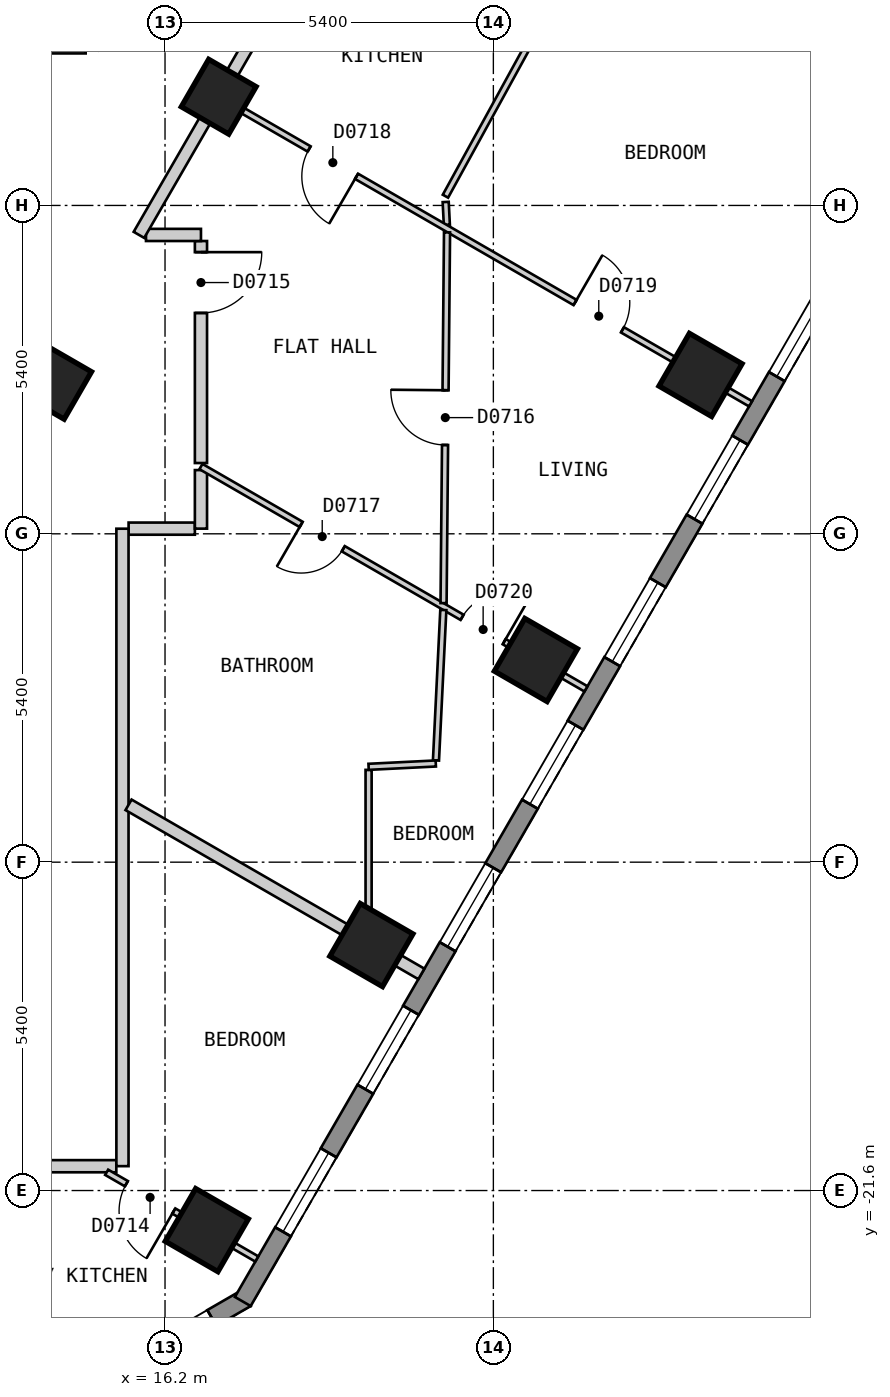
"""IFC4 building model, lengths in metres.
Left out: names, types, materials, properties, quantities, classifications, styles, units other than length and angle.
Written with IfcOpenShell. Run it as: python <this file> out.ifc"""

import sys

from ifc_helpers import new_model, si_unit, direction, frame, frame_2d, origin, origin_2d, place, context, subcontext, project, spatial, polyline, rectangle, outline, extrude, element, fill, save


model = new_model("IFC4")
c1 = context("Model", 3, precision=1e-05, world=origin(), true_north=direction((0.0, 1.0)))
c2 = subcontext(c1, "Body", "Model", "MODEL_VIEW")
j1 = project(units=[si_unit("LENGTHUNIT", "METRE"), si_unit("PLANEANGLEUNIT", "RADIAN")], contexts=[c1])
p1 = place(None, origin())
s1 = spatial("IfcSite", under=j1, at=p1, CompositionType="ELEMENT")
p2 = place(p1, origin())
s2 = spatial("IfcBuilding", under=s1, at=p2, CompositionType="ELEMENT")
p3 = place(p2, frame((0.0, 0.0, 99.0)))
s3 = spatial("IfcBuildingStorey", under=s2, at=p3, CompositionType="ELEMENT", Elevation=99.0)
for number, where, z_axis, x_axis in (
    (1, (16.887, -22.251, 0.0), (0.0, 0.0, 1.0), (0.5, 0.866, 0.0)),
    (2, (19.594, -17.563, 0.0), (0.0, 0.0, 1.0), (0.5, 0.866, 0.0)),
    (3, (22.3, -12.875, 0.0), (0.0, 0.0, 1.0), (0.5, 0.866, 0.0)),
    (4, (25.007, -8.187, 0.0), (0.0, 0.0, 1.0), (0.5, 0.866, 0.0)),
):
    element("IfcColumn", number, at=place(p3, frame(where, z_axis=z_axis, x_axis=x_axis)), inside=s3, PredefinedType="COLUMN", context=c2, shape_type="SweptSolid", body=[
        extrude(rectangle(XDim=1.0, YDim=1.0, at=origin_2d()), origin(), (0.0, 0.0, 1.0), 3.0),
    ])
for number, where, z_axis, x_axis in (
    (5, (14.376, -8.3, 0.0), (0.0, 0.0, 1.0), (0.5, 0.866, 0.0)),
    (6, (17.083, -3.612, 0.0), (0.0, 0.0, 1.0), (0.5, 0.866, 0.0)),
):
    element("IfcColumn", number, at=place(p3, frame(where, z_axis=z_axis, x_axis=x_axis)), inside=s3, PredefinedType="COLUMN", context=c2, shape_type="SweptSolid", body=[
        extrude(rectangle(XDim=0.9, YDim=0.9, at=origin_2d()), origin(), (0.0, 0.0, 1.0), 3.0),
    ])
p4 = place(p3, frame((13.204, -25.87, 0.0), z_axis=(0.0, 0.0, 1.0), x_axis=(0.866010750942, 0.50002537861, 0.0)))
e7 = element("IfcWall", 7, at=p4, inside=s3, PredefinedType="SOLIDWALL", context=c2, shape_type="SweptSolid", body=[
    extrude(outline(polyline([(0.0, -0.15), (5.0, -0.15), (4.919, 0.15), (0.08, 0.15), (0.0, -0.15)])), origin(), (0.0, 0.0, 1.0), 2.7),
])
p5 = place(p4, frame((0.65, 0.0, 0.15)))
e8 = element("IfcOpeningElement", 8, at=p5, cuts=e7, PredefinedType="OPENING", context=c2, shape_type="SweptSolid", body=[
    extrude(rectangle(XDim=1.2, YDim=2.1, at=frame_2d((0.6, 1.05))), frame((0.0, 0.16, 0.0), z_axis=(0.0, -1.0, 0.0), x_axis=(1.0, 0.0, 0.0)), (0.0, 0.0, 1.0), 0.32),
])
p6 = place(p4, frame((3.149, 0.0, 0.15)))
e9 = element("IfcOpeningElement", 9, at=p6, cuts=e7, PredefinedType="OPENING", context=c2, shape_type="SweptSolid", body=[
    extrude(rectangle(XDim=1.2, YDim=2.1, at=frame_2d((0.6, 1.05))), frame((0.0, 0.16, 0.0), z_axis=(0.0, -1.0, 0.0), x_axis=(1.0, 0.0, 0.0)), (0.0, 0.0, 1.0), 0.32),
])
p7 = place(p3, frame((17.479, -23.425, 0.0), z_axis=(0.0, 0.0, 1.0), x_axis=(0.500035407905, 0.866004960056, 0.0)))
e10 = element("IfcWall", 10, at=p7, inside=s3, PredefinedType="SOLIDWALL", context=c2, shape_type="SweptSolid", body=[
    extrude(outline(polyline([(0.0, -0.15), (23.094, -0.15), (23.014, 0.15), (0.08, 0.15), (0.0, -0.15)])), origin(), (0.0, 0.0, 1.0), 2.7),
])
p8 = place(p7, frame((1.324, 0.0, 0.15)))
e11 = element("IfcOpeningElement", 11, at=p8, cuts=e10, PredefinedType="OPENING", context=c2, shape_type="SweptSolid", body=[
    extrude(rectangle(XDim=1.5, YDim=2.1, at=frame_2d((0.75, 1.05))), frame((0.0, 0.16, 0.0), z_axis=(0.0, -1.0, 0.0), x_axis=(1.0, 0.0, 0.0)), (0.0, 0.0, 1.0), 0.32),
])
p9 = place(p7, frame((4.031, 0.0, 0.15)))
e12 = element("IfcOpeningElement", 12, at=p9, cuts=e10, PredefinedType="OPENING", context=c2, shape_type="SweptSolid", body=[
    extrude(rectangle(XDim=1.5, YDim=2.1, at=frame_2d((0.75, 1.05))), frame((0.0, 0.16, 0.0), z_axis=(0.0, -1.0, 0.0), x_axis=(1.0, 0.0, 0.0)), (0.0, 0.0, 1.0), 0.32),
])
p10 = place(p7, frame((6.737, 0.0, 0.15)))
e13 = element("IfcOpeningElement", 13, at=p10, cuts=e10, PredefinedType="OPENING", context=c2, shape_type="SweptSolid", body=[
    extrude(rectangle(XDim=1.5, YDim=2.1, at=frame_2d((0.75, 1.05))), frame((0.0, 0.16, 0.0), z_axis=(0.0, -1.0, 0.0), x_axis=(1.0, 0.0, 0.0)), (0.0, 0.0, 1.0), 0.32),
])
p11 = place(p7, frame((9.444, 0.0, 0.15)))
e14 = element("IfcOpeningElement", 14, at=p11, cuts=e10, PredefinedType="OPENING", context=c2, shape_type="SweptSolid", body=[
    extrude(rectangle(XDim=1.5, YDim=2.1, at=frame_2d((0.75, 1.05))), frame((0.0, 0.16, 0.0), z_axis=(0.0, -1.0, 0.0), x_axis=(1.0, 0.0, 0.0)), (0.0, 0.0, 1.0), 0.32),
])
p12 = place(p7, frame((12.151, 0.0, 0.15)))
e15 = element("IfcOpeningElement", 15, at=p12, cuts=e10, PredefinedType="OPENING", context=c2, shape_type="SweptSolid", body=[
    extrude(rectangle(XDim=1.5, YDim=2.1, at=frame_2d((0.75, 1.05))), frame((0.0, 0.16, 0.0), z_axis=(0.0, -1.0, 0.0), x_axis=(1.0, 0.0, 0.0)), (0.0, 0.0, 1.0), 0.32),
])
p13 = place(p7, frame((14.857, 0.0, 0.15)))
e16 = element("IfcOpeningElement", 16, at=p13, cuts=e10, PredefinedType="OPENING", context=c2, shape_type="SweptSolid", body=[
    extrude(rectangle(XDim=1.5, YDim=2.1, at=frame_2d((0.75, 1.05))), frame((0.0, 0.16, 0.0), z_axis=(0.0, -1.0, 0.0), x_axis=(1.0, 0.0, 0.0)), (0.0, 0.0, 1.0), 0.32),
])
p14 = place(p7, frame((17.564, 0.0, 0.15)))
e17 = element("IfcOpeningElement", 17, at=p14, cuts=e10, PredefinedType="OPENING", context=c2, shape_type="SweptSolid", body=[
    extrude(rectangle(XDim=1.5, YDim=2.1, at=frame_2d((0.75, 1.05))), frame((0.0, 0.16, 0.0), z_axis=(0.0, -1.0, 0.0), x_axis=(1.0, 0.0, 0.0)), (0.0, 0.0, 1.0), 0.32),
])
p15 = place(p7, frame((20.271, 0.0, 0.15)))
e18 = element("IfcOpeningElement", 18, at=p15, cuts=e10, PredefinedType="OPENING", context=c2, shape_type="SweptSolid", body=[
    extrude(rectangle(XDim=1.5, YDim=2.1, at=frame_2d((0.75, 1.05))), frame((0.0, 0.16, 0.0), z_axis=(0.0, -1.0, 0.0), x_axis=(1.0, 0.0, 0.0)), (0.0, 0.0, 1.0), 0.32),
])
p16 = place(p3, frame((16.791, -5.985, 0.0), z_axis=(0.0, 0.0, 1.0), x_axis=(0.0, -1.0, 0.0)))
e19 = element("IfcWall", 19, at=p16, inside=s3, PredefinedType="PARTITIONING", context=c2, shape_type="SweptSolid", body=[
    extrude(rectangle(XDim=3.651, YDim=0.2, at=frame_2d((1.825, 0.0))), origin(), (0.0, 0.0, 1.0), 2.7),
])
p17 = place(p16, frame((0.183, 0.0, 0.0)))
e20 = element("IfcOpeningElement", 20, at=p17, cuts=e19, PredefinedType="OPENING", context=c2, shape_type="SweptSolid", body=[
    extrude(rectangle(XDim=1.0, YDim=2.1, at=frame_2d((0.5, 1.05))), frame((0.0, 0.11, 0.0), z_axis=(0.0, -1.0, 0.0), x_axis=(1.0, 0.0, 0.0)), (0.0, 0.0, 1.0), 0.22),
])
p18 = place(p3, frame((15.887, -5.885, 0.0), z_axis=(0.0, 0.0, 1.0), x_axis=(1.0, 0.0, 0.0)))
e21 = element("IfcWall", 21, at=p18, inside=s3, PredefinedType="PARTITIONING", context=c2, shape_type="SweptSolid", body=[
    extrude(rectangle(XDim=0.904, YDim=0.2, at=frame_2d((0.452, 0.0))), origin(), (0.0, 0.0, 1.0), 2.7),
])
p19 = place(p3, frame((15.601, -10.715, 0.0), z_axis=(0.0, 0.0, 1.0), x_axis=(1.0, 0.0, 0.0)))
e22 = element("IfcWall", 22, at=p19, inside=s3, PredefinedType="PARTITIONING", context=c2, shape_type="SweptSolid", body=[
    extrude(rectangle(XDim=1.09, YDim=0.2, at=frame_2d((0.545, 0.0))), origin(), (0.0, 0.0, 1.0), 2.7),
])
p20 = place(p3, frame((-15.499, -21.2, 0.0), z_axis=(0.0, 0.0, 1.0), x_axis=(1.0, 0.0, 0.0)))
e23 = element("IfcWall", 23, at=p20, inside=s3, PredefinedType="PARTITIONING", context=c2, shape_type="SweptSolid", body=[
    extrude(rectangle(XDim=30.898, YDim=0.2, at=frame_2d((15.449, 0.0))), origin(), (0.0, 0.0, 1.0), 2.7),
])
p21 = place(p20, frame((9.977, 0.0, 0.0)))
e24 = element("IfcOpeningElement", 24, at=p21, cuts=e23, PredefinedType="OPENING", context=c2, shape_type="SweptSolid", body=[
    extrude(rectangle(XDim=1.0, YDim=2.1, at=frame_2d((0.5, 1.05))), frame((0.0, 0.11, 0.0), z_axis=(0.0, -1.0, 0.0), x_axis=(1.0, 0.0, 0.0)), (0.0, 0.0, 1.0), 0.22),
])
p22 = place(p20, frame((25.046, 0.0, 0.0)))
e25 = element("IfcOpeningElement", 25, at=p22, cuts=e23, PredefinedType="OPENING", context=c2, shape_type="SweptSolid", body=[
    extrude(rectangle(XDim=1.0, YDim=2.1, at=frame_2d((0.5, 1.05))), frame((0.0, 0.11, 0.0), z_axis=(0.0, -1.0, 0.0), x_axis=(1.0, 0.0, 0.0)), (0.0, 0.0, 1.0), 0.22),
])
p23 = place(p3, frame((6.929, -2.8, 0.0), z_axis=(0.0, 0.0, 1.0), x_axis=(1.0, 0.0, 0.0)))
e26 = element("IfcWall", 26, at=p23, inside=s3, PredefinedType="PARTITIONING", context=c2, shape_type="SweptSolid", body=[
    extrude(rectangle(XDim=7.966, YDim=0.2, at=frame_2d((3.983, 0.0))), origin(), (0.0, 0.0, 1.0), 2.7),
])
p24 = place(p3, frame((15.771, -5.884, 0.0), z_axis=(0.0, 0.0, 1.0), x_axis=(0.499917542299, 0.866073005526, 0.0)))
e27 = element("IfcWall", 27, at=p24, inside=s3, PredefinedType="PARTITIONING", context=c2, shape_type="SweptSolid", body=[
    extrude(rectangle(XDim=5.525, YDim=0.2, at=frame_2d((2.762, 0.0))), origin(), (0.0, 0.0, 1.0), 2.7),
])
p25 = place(p3, frame((15.5, -21.199, 0.0), z_axis=(0.0, 0.0, 1.0), x_axis=(0.0, 1.0, 0.0)))
e28 = element("IfcWall", 28, at=p25, inside=s3, PredefinedType="PARTITIONING", context=c2, shape_type="SweptSolid", body=[
    extrude(rectangle(XDim=10.483, YDim=0.2, at=frame_2d((5.241, 0.0))), origin(), (0.0, 0.0, 1.0), 2.7),
])
p26 = place(p3, frame((16.791, -10.715, 0.0), z_axis=(0.0, 0.0, 1.0), x_axis=(0.0, 1.0, 0.0)))
e29 = element("IfcWall", 29, at=p26, inside=s3, PredefinedType="PARTITIONING", context=c2, shape_type="SweptSolid", body=[
    extrude(rectangle(XDim=0.963, YDim=0.2, at=frame_2d((0.481, 0.0))), origin(), (0.0, 0.0, 1.0), 2.7),
])
p27 = place(p3, frame((20.816, -5.343, 0.0), z_axis=(0.0, 0.0, 1.0), x_axis=(0.05045379463, -0.99872639627, 0.0)))
e30 = element("IfcWall", 30, at=p27, inside=s3, PredefinedType="PARTITIONING", context=c2, shape_type="SweptSolid", body=[
    extrude(rectangle(XDim=0.377, YDim=0.1, at=frame_2d((0.189, 0.0))), origin(), (0.0, 0.0, 1.0), 2.7),
])
p28 = place(p3, frame((15.24, -21.3, 0.0), z_axis=(0.0, 0.0, 1.0), x_axis=(0.866090043625, -0.499888023795, 0.0)))
e31 = element("IfcWall", 31, at=p28, inside=s3, PredefinedType="PARTITIONING", context=c2, shape_type="SweptSolid", body=[
    extrude(rectangle(XDim=2.851, YDim=0.1, at=frame_2d((1.425, 0.0))), origin(), (0.0, 0.0, 1.0), 2.7),
])
p29 = place(p28, frame((0.375, 0.0, 0.0)))
e32 = element("IfcOpeningElement", 32, at=p29, cuts=e31, PredefinedType="OPENING", context=c2, shape_type="SweptSolid", body=[
    extrude(rectangle(XDim=0.9, YDim=2.1, at=frame_2d((0.45, 1.05))), frame((0.0, 0.06, 0.0), z_axis=(0.0, -1.0, 0.0), x_axis=(1.0, 0.0, 0.0)), (0.0, 0.0, 1.0), 0.12),
])
p30 = place(p3, frame((16.791, -9.694, 0.0), z_axis=(0.0, 0.0, 1.0), x_axis=(0.866013208994, -0.500021121402, 0.0)))
e33 = element("IfcWall", 33, at=p30, inside=s3, PredefinedType="PARTITIONING", context=c2, shape_type="SweptSolid", body=[
    extrude(rectangle(XDim=7.312, YDim=0.1, at=frame_2d((3.656, 0.0))), origin(), (0.0, 0.0, 1.0), 2.7),
])
p31 = place(p30, frame((1.903, 0.0, 0.0)))
e34 = element("IfcOpeningElement", 34, at=p31, cuts=e33, PredefinedType="OPENING", context=c2, shape_type="SweptSolid", body=[
    extrude(rectangle(XDim=0.8, YDim=2.1, at=frame_2d((0.4, 1.05))), frame((0.0, 0.06, 0.0), z_axis=(0.0, -1.0, 0.0), x_axis=(1.0, 0.0, 0.0)), (0.0, 0.0, 1.0), 0.12),
])
p32 = place(p30, frame((4.959, 0.0, 0.0)))
e35 = element("IfcOpeningElement", 35, at=p32, cuts=e33, PredefinedType="OPENING", context=c2, shape_type="SweptSolid", body=[
    extrude(rectangle(XDim=0.8, YDim=2.1, at=frame_2d((0.4, 1.05))), frame((0.0, 0.06, 0.0), z_axis=(0.0, -1.0, 0.0), x_axis=(1.0, 0.0, 0.0)), (0.0, 0.0, 1.0), 0.12),
])
p33 = place(p3, frame((17.169, -3.662, 0.0), z_axis=(0.0, 0.0, 1.0), x_axis=(0.866047370643, -0.499961950354, 0.0)))
e36 = element("IfcWall", 36, at=p33, inside=s3, PredefinedType="PARTITIONING", context=c2, shape_type="SweptSolid", body=[
    extrude(rectangle(XDim=10.001, YDim=0.1, at=frame_2d((5.0, 0.0))), origin(), (0.0, 0.0, 1.0), 2.7),
])
p34 = place(p33, frame((1.618, 0.0, 0.0)))
e37 = element("IfcOpeningElement", 37, at=p34, cuts=e36, PredefinedType="OPENING", context=c2, shape_type="SweptSolid", body=[
    extrude(rectangle(XDim=0.9, YDim=2.1, at=frame_2d((0.45, 1.05))), frame((0.0, 0.06, 0.0), z_axis=(0.0, -1.0, 0.0), x_axis=(1.0, 0.0, 0.0)), (0.0, 0.0, 1.0), 0.12),
])
p35 = place(p33, frame((6.668, 0.0, 0.0)))
e38 = element("IfcOpeningElement", 38, at=p35, cuts=e36, PredefinedType="OPENING", context=c2, shape_type="SweptSolid", body=[
    extrude(rectangle(XDim=0.9, YDim=2.1, at=frame_2d((0.45, 1.05))), frame((0.0, 0.06, 0.0), z_axis=(0.0, -1.0, 0.0), x_axis=(1.0, 0.0, 0.0)), (0.0, 0.0, 1.0), 0.12),
])
p36 = place(p3, frame((20.812, -5.248, 0.0), z_axis=(0.0, 0.0, 1.0), x_axis=(0.481296891345, 0.876557643502, 0.0)))
e39 = element("IfcWall", 39, at=p36, inside=s3, PredefinedType="PARTITIONING", context=c2, shape_type="SweptSolid", body=[
    extrude(rectangle(XDim=4.733, YDim=0.1, at=frame_2d((2.367, 0.0))), origin(), (0.0, 0.0, 1.0), 2.7),
])
p37 = place(p3, frame((20.656, -14.527, 0.0), z_axis=(0.0, 0.0, 1.0), x_axis=(0.048885629948, 0.998804382842, 0.0)))
e40 = element("IfcWall", 40, at=p37, inside=s3, PredefinedType="PARTITIONING", context=c2, shape_type="SweptSolid", body=[
    extrude(rectangle(XDim=2.477, YDim=0.1, at=frame_2d((1.239, 0.0))), origin(), (0.0, 0.0, 1.0), 2.7),
])
p38 = place(p3, frame((20.781, -11.94, 0.0), z_axis=(0.0, 0.0, 1.0), x_axis=(0.009329670416, 0.999956477678, 0.0)))
e41 = element("IfcWall", 41, at=p38, inside=s3, PredefinedType="PARTITIONING", context=c2, shape_type="SweptSolid", body=[
    extrude(rectangle(XDim=6.097, YDim=0.1, at=frame_2d((3.049, 0.0))), origin(), (0.0, 0.0, 1.0), 2.7),
])
p39 = place(p38, frame((2.601, 0.0, 0.0)))
e42 = element("IfcOpeningElement", 42, at=p39, cuts=e41, PredefinedType="OPENING", context=c2, shape_type="SweptSolid", body=[
    extrude(rectangle(XDim=0.9, YDim=2.1, at=frame_2d((0.45, 1.05))), frame((0.0, 0.06, 0.0), z_axis=(0.0, -1.0, 0.0), x_axis=(1.0, 0.0, 0.0)), (0.0, 0.0, 1.0), 0.12),
])
p40 = place(p3, frame((19.548, -17.421, 0.0), z_axis=(0.0, 0.0, 1.0), x_axis=(0.0, 1.0, 0.0)))
e43 = element("IfcWall", 43, at=p40, inside=s3, PredefinedType="PARTITIONING", context=c2, shape_type="SweptSolid", body=[
    extrude(rectangle(XDim=2.739, YDim=0.1, at=frame_2d((1.37, 0.0))), origin(), (0.0, 0.0, 1.0), 2.7),
])
p41 = place(p3, frame((19.548, -14.632, 0.0), z_axis=(0.0, 0.0, 1.0), x_axis=(0.998755638501, 0.049871580712, 0.0)))
e44 = element("IfcWall", 44, at=p41, inside=s3, PredefinedType="PARTITIONING", context=c2, shape_type="SweptSolid", body=[
    extrude(rectangle(XDim=1.106, YDim=0.1, at=frame_2d((0.553, 0.0))), origin(), (0.0, 0.0, 1.0), 2.7),
])
p42 = place(p3, frame((15.6, -15.257, 0.0), z_axis=(0.0, 0.0, 1.0), x_axis=(0.86598379672, -0.500072058625, 0.0)))
e45 = element("IfcWall", 45, at=p42, inside=s3, PredefinedType="PARTITIONING", context=c2, shape_type="SweptSolid", body=[
    extrude(rectangle(XDim=5.561, YDim=0.2, at=frame_2d((2.781, 0.0))), origin(), (0.0, 0.0, 1.0), 2.7),
])
p43 = place(p6, origin())
e46 = element("IfcWindow", 46, at=p43, inside=s3, PartitioningType="SINGLE_PANEL", PredefinedType="WINDOW", context=c2, shape_type="SweptSolid", body=[
    extrude(rectangle(XDim=1.2, YDim=2.1, at=frame_2d((0.6, 1.05))), frame((0.0, 0.03, 0.0), z_axis=(0.0, -1.0, 0.0), x_axis=(1.0, 0.0, 0.0)), (0.0, 0.0, 1.0), 0.06),
])
fill(e9, e46)
p44 = place(p8, origin())
e47 = element("IfcWindow", 47, at=p44, inside=s3, PartitioningType="SINGLE_PANEL", PredefinedType="WINDOW", context=c2, shape_type="SweptSolid", body=[
    extrude(rectangle(XDim=1.5, YDim=2.1, at=frame_2d((0.75, 1.05))), frame((0.0, 0.03, 0.0), z_axis=(0.0, -1.0, 0.0), x_axis=(1.0, 0.0, 0.0)), (0.0, 0.0, 1.0), 0.06),
])
fill(e11, e47)
p45 = place(p9, origin())
e48 = element("IfcWindow", 48, at=p45, inside=s3, PartitioningType="SINGLE_PANEL", PredefinedType="WINDOW", context=c2, shape_type="SweptSolid", body=[
    extrude(rectangle(XDim=1.5, YDim=2.1, at=frame_2d((0.75, 1.05))), frame((0.0, 0.03, 0.0), z_axis=(0.0, -1.0, 0.0), x_axis=(1.0, 0.0, 0.0)), (0.0, 0.0, 1.0), 0.06),
])
fill(e12, e48)
p46 = place(p10, origin())
e49 = element("IfcWindow", 49, at=p46, inside=s3, PartitioningType="SINGLE_PANEL", PredefinedType="WINDOW", context=c2, shape_type="SweptSolid", body=[
    extrude(rectangle(XDim=1.5, YDim=2.1, at=frame_2d((0.75, 1.05))), frame((0.0, 0.03, 0.0), z_axis=(0.0, -1.0, 0.0), x_axis=(1.0, 0.0, 0.0)), (0.0, 0.0, 1.0), 0.06),
])
fill(e13, e49)
p47 = place(p11, origin())
e50 = element("IfcWindow", 50, at=p47, inside=s3, PartitioningType="SINGLE_PANEL", PredefinedType="WINDOW", context=c2, shape_type="SweptSolid", body=[
    extrude(rectangle(XDim=1.5, YDim=2.1, at=frame_2d((0.75, 1.05))), frame((0.0, 0.03, 0.0), z_axis=(0.0, -1.0, 0.0), x_axis=(1.0, 0.0, 0.0)), (0.0, 0.0, 1.0), 0.06),
])
fill(e14, e50)
p48 = place(p12, origin())
e51 = element("IfcWindow", 51, at=p48, inside=s3, PartitioningType="SINGLE_PANEL", PredefinedType="WINDOW", context=c2, shape_type="SweptSolid", body=[
    extrude(rectangle(XDim=1.5, YDim=2.1, at=frame_2d((0.75, 1.05))), frame((0.0, 0.03, 0.0), z_axis=(0.0, -1.0, 0.0), x_axis=(1.0, 0.0, 0.0)), (0.0, 0.0, 1.0), 0.06),
])
fill(e15, e51)
p49 = place(p13, origin())
e52 = element("IfcWindow", 52, at=p49, inside=s3, PartitioningType="SINGLE_PANEL", PredefinedType="WINDOW", context=c2, shape_type="SweptSolid", body=[
    extrude(rectangle(XDim=1.5, YDim=2.1, at=frame_2d((0.75, 1.05))), frame((0.0, 0.03, 0.0), z_axis=(0.0, -1.0, 0.0), x_axis=(1.0, 0.0, 0.0)), (0.0, 0.0, 1.0), 0.06),
])
fill(e16, e52)
p50 = place(p14, origin())
e53 = element("IfcWindow", 53, at=p50, inside=s3, PartitioningType="SINGLE_PANEL", PredefinedType="WINDOW", context=c2, shape_type="SweptSolid", body=[
    extrude(rectangle(XDim=1.5, YDim=2.1, at=frame_2d((0.75, 1.05))), frame((0.0, 0.03, 0.0), z_axis=(0.0, -1.0, 0.0), x_axis=(1.0, 0.0, 0.0)), (0.0, 0.0, 1.0), 0.06),
])
fill(e17, e53)
p51 = place(p29, origin())
e54 = element("IfcDoor", 54, at=p51, inside=s3, OperationType="SINGLE_SWING_RIGHT", PredefinedType="DOOR", context=c2, shape_type="SweptSolid", body=[
    extrude(rectangle(XDim=0.9, YDim=2.1, at=frame_2d((0.45, 1.05))), frame((0.0, 0.025, 0.0), z_axis=(0.0, -1.0, 0.0), x_axis=(1.0, 0.0, 0.0)), (0.0, 0.0, 1.0), 0.05),
])
fill(e32, e54)
p52 = place(p17, origin())
e55 = element("IfcDoor", 55, at=p52, inside=s3, OperationType="SINGLE_SWING_LEFT", PredefinedType="DOOR", context=c2, shape_type="SweptSolid", body=[
    extrude(rectangle(XDim=1.0, YDim=2.1, at=frame_2d((0.5, 1.05))), frame((0.0, 0.025, 0.0), z_axis=(0.0, -1.0, 0.0), x_axis=(1.0, 0.0, 0.0)), (0.0, 0.0, 1.0), 0.05),
])
fill(e20, e55)
p53 = place(p39, origin())
e56 = element("IfcDoor", 56, at=p53, inside=s3, OperationType="SINGLE_SWING_RIGHT", PredefinedType="DOOR", context=c2, shape_type="SweptSolid", body=[
    extrude(rectangle(XDim=0.9, YDim=2.1, at=frame_2d((0.45, 1.05))), frame((0.0, 0.025, 0.0), z_axis=(0.0, -1.0, 0.0), x_axis=(1.0, 0.0, 0.0)), (0.0, 0.0, 1.0), 0.05),
])
fill(e42, e56)
p54 = place(p31, origin())
e57 = element("IfcDoor", 57, at=p54, inside=s3, OperationType="SINGLE_SWING_LEFT", PredefinedType="DOOR", context=c2, shape_type="SweptSolid", body=[
    extrude(rectangle(XDim=0.8, YDim=2.1, at=frame_2d((0.4, 1.05))), frame((0.0, 0.025, 0.0), z_axis=(0.0, -1.0, 0.0), x_axis=(1.0, 0.0, 0.0)), (0.0, 0.0, 1.0), 0.05),
])
fill(e34, e57)
p55 = place(p34, origin())
e58 = element("IfcDoor", 58, at=p55, inside=s3, OperationType="SINGLE_SWING_RIGHT", PredefinedType="DOOR", context=c2, shape_type="SweptSolid", body=[
    extrude(rectangle(XDim=0.9, YDim=2.1, at=frame_2d((0.45, 1.05))), frame((0.0, 0.025, 0.0), z_axis=(0.0, -1.0, 0.0), x_axis=(1.0, 0.0, 0.0)), (0.0, 0.0, 1.0), 0.05),
])
fill(e37, e58)
p56 = place(p35, origin())
e59 = element("IfcDoor", 59, at=p56, inside=s3, OperationType="SINGLE_SWING_LEFT", PredefinedType="DOOR", context=c2, shape_type="SweptSolid", body=[
    extrude(rectangle(XDim=0.9, YDim=2.1, at=frame_2d((0.45, 1.05))), frame((0.0, 0.025, 0.0), z_axis=(0.0, -1.0, 0.0), x_axis=(1.0, 0.0, 0.0)), (0.0, 0.0, 1.0), 0.05),
])
fill(e38, e59)
p57 = place(p32, origin())
e60 = element("IfcDoor", 60, at=p57, inside=s3, OperationType="SINGLE_SWING_RIGHT", PredefinedType="DOOR", context=c2, shape_type="SweptSolid", body=[
    extrude(rectangle(XDim=0.8, YDim=2.1, at=frame_2d((0.4, 1.05))), frame((0.0, 0.025, 0.0), z_axis=(0.0, -1.0, 0.0), x_axis=(1.0, 0.0, 0.0)), (0.0, 0.0, 1.0), 0.05),
])
fill(e35, e60)
save(model, sys.argv[1])
